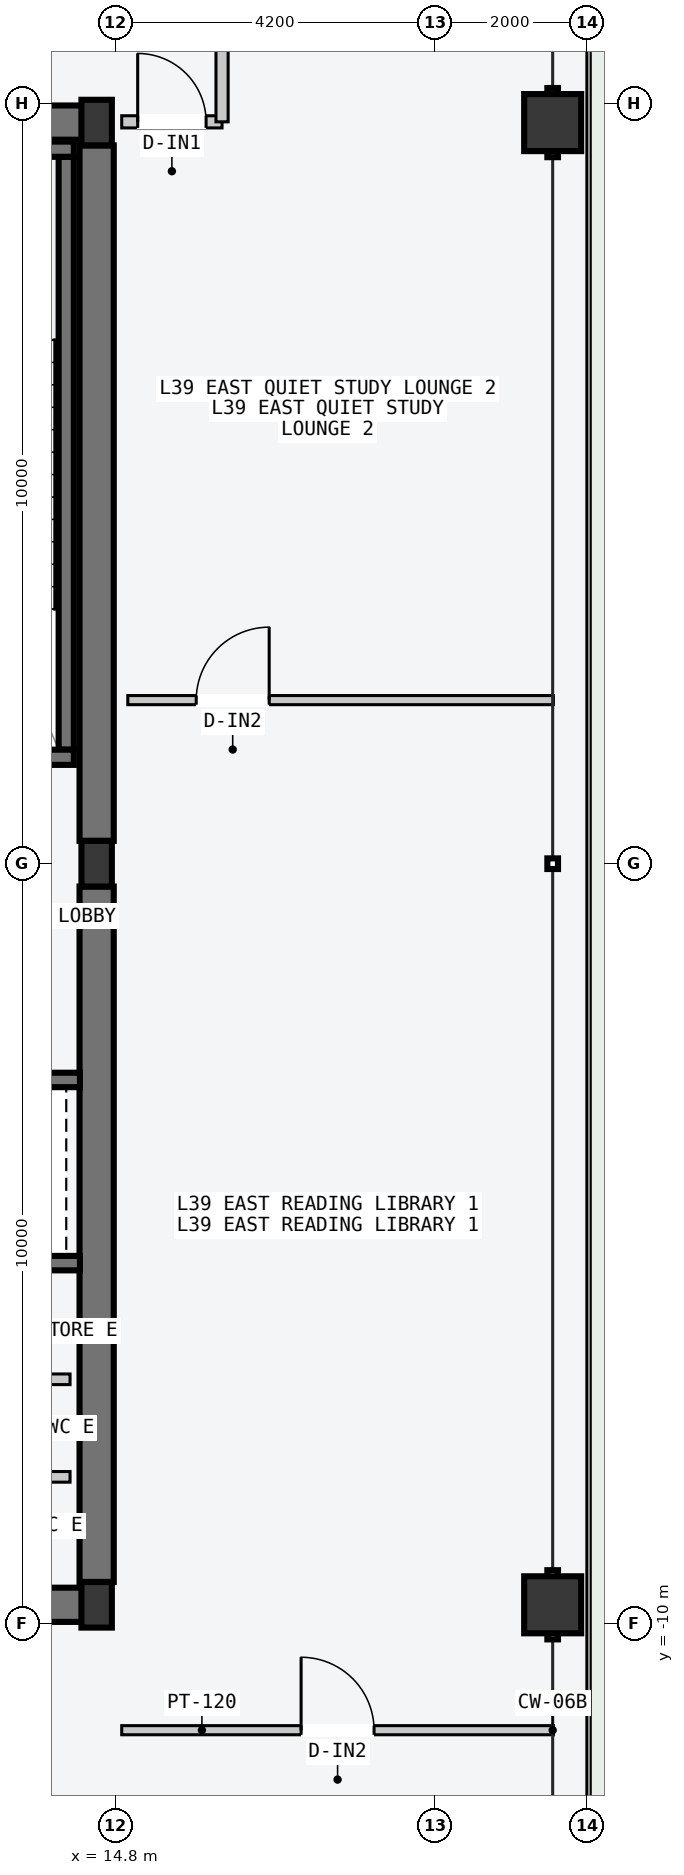
"""IFC4 building model, lengths in metres.
Left out: names, types, materials, properties, quantities, classifications, styles, units other than length and angle.
Written with IfcOpenShell. Run it as: python <this file> out.ifc"""

import sys

from ifc_helpers import new_model, si_unit, direction, frame, frame_2d, origin, origin_2d, place, context, subcontext, project, spatial, rectangle, hollow_rectangle, i_section, extrude, element, fill, save


model = new_model("IFC4")
c1 = context("Model", 3, precision=1e-05, world=origin(), true_north=direction((0.0, 1.0)))
c2 = subcontext(c1, "Body", "Model", "MODEL_VIEW")
j1 = project(units=[si_unit("LENGTHUNIT", "METRE"), si_unit("PLANEANGLEUNIT", "RADIAN")], contexts=[c1])
p1 = place(None, origin())
s1 = spatial("IfcSite", under=j1, at=p1, CompositionType="ELEMENT")
p2 = place(p1, origin())
s2 = spatial("IfcBuilding", under=s1, at=p2, CompositionType="ELEMENT")
p3 = place(p2, frame((0.0, 0.0, 150.6)))
s3 = spatial("IfcBuildingStorey", under=s2, at=p3, CompositionType="ELEMENT", Elevation=150.6)
for number, where, z_axis, x_axis in (
    (1, (8.07, -9.75, -0.2), (0.0, 0.0, 1.0), (1.0, 0.0, 0.0)),
    (2, (8.07, 9.75, -0.2), (0.0, 0.0, 1.0), (1.0, 0.0, 0.0)),
):
    element("IfcWall", number, at=place(p3, frame(where, z_axis=z_axis, x_axis=x_axis)), inside=s3, PredefinedType="SHEAR", context=c2, shape_type="SweptSolid", body=[
        extrude(rectangle(XDim=6.46, YDim=0.45, at=frame_2d((3.23, 0.0))), origin(), (0.0, 0.0, 1.0), 4.5),
    ])
for number, where, z_axis, x_axis in (
    (3, (14.55, -9.45, -0.2), (0.0, 0.0, 1.0), (0.0, 1.0, 0.0)),
    (4, (14.55, 0.3, -0.2), (0.0, 0.0, 1.0), (0.0, 1.0, 0.0)),
):
    element("IfcWall", number, at=place(p3, frame(where, z_axis=z_axis, x_axis=x_axis)), inside=s3, PredefinedType="SHEAR", context=c2, shape_type="SweptSolid", body=[
        extrude(rectangle(XDim=9.15, YDim=0.45, at=frame_2d((4.575, 0.0))), origin(), (0.0, 0.0, 1.0), 4.5),
    ])
p4 = place(p3, frame((14.15, 1.5, -0.2), z_axis=(0.0, 0.0, 1.0), x_axis=(0.0, 1.0, 0.0)))
e5 = element("IfcWall", 5, at=p4, inside=s3, PredefinedType="SOLIDWALL", context=c2, shape_type="SweptSolid", body=[
    extrude(rectangle(XDim=7.8, YDim=0.2, at=frame_2d((3.9, 0.0))), origin(), (0.0, 0.0, 1.0), 4.5),
])
p5 = place(p3, frame((10.15, 1.4, -0.2), z_axis=(0.0, 0.0, 1.0), x_axis=(1.0, 0.0, 0.0)))
e6 = element("IfcWall", 6, at=p5, inside=s3, PredefinedType="SOLIDWALL", context=c2, shape_type="SweptSolid", body=[
    extrude(rectangle(XDim=4.1, YDim=0.2, at=frame_2d((2.05, 0.0))), origin(), (0.0, 0.0, 1.0), 4.5),
])
p6 = place(p5, frame((1.5, 0.0, 0.2)))
e7 = element("IfcOpeningElement", 7, at=p6, cuts=e6, PredefinedType="OPENING", context=c2, shape_type="SweptSolid", body=[
    extrude(rectangle(XDim=1.12, YDim=2.18, at=frame_2d((0.56, 1.09))), frame((0.0, 0.11, 0.0), z_axis=(0.0, -1.0, 0.0), x_axis=(1.0, 0.0, 0.0)), (0.0, 0.0, 1.0), 0.22),
])
p7 = place(p3, frame((10.15, 9.4, -0.2), z_axis=(0.0, 0.0, 1.0), x_axis=(1.0, 0.0, 0.0)))
e8 = element("IfcWall", 8, at=p7, inside=s3, PredefinedType="SOLIDWALL", context=c2, shape_type="SweptSolid", body=[
    extrude(rectangle(XDim=4.1, YDim=0.2, at=frame_2d((2.05, 0.0))), origin(), (0.0, 0.0, 1.0), 4.5),
])
for number, where, z_axis, x_axis in (
    (9, (14.55, -9.75, 0.0), (0.0, 0.0, 1.0), (1.0, 0.0, 0.0)),
    (10, (14.55, 0.0, 0.0), (0.0, 0.0, 1.0), (1.0, 0.0, 0.0)),
    (11, (14.55, 9.75, 0.0), (0.0, 0.0, 1.0), (1.0, 0.0, 0.0)),
):
    element("IfcColumn", number, at=place(p3, frame(where, z_axis=z_axis, x_axis=x_axis)), inside=s3, PredefinedType="COLUMN", context=c2, shape_type="SweptSolid", body=[
        extrude(i_section(OverallWidth=0.4, OverallDepth=0.6, WebThickness=0.022, FlangeThickness=0.036, at=origin_2d()), origin(), (0.0, 0.0, 1.0), 4.5),
    ])
for number, where, z_axis, x_axis in (
    (12, (20.55, -9.75, -0.2), (0.0, 0.0, 1.0), (0.0, 1.0, 0.0)),
    (13, (20.55, 9.75, -0.2), (0.0, 0.0, 1.0), (0.0, 1.0, 0.0)),
):
    element("IfcColumn", number, at=place(p3, frame(where, z_axis=z_axis, x_axis=x_axis)), inside=s3, PredefinedType="COLUMN", context=c2, shape_type="SweptSolid", body=[
        extrude(hollow_rectangle(XDim=0.75, YDim=0.75, WallThickness=0.032, at=origin_2d()), origin(), (0.0, 0.0, 1.0), 4.7),
    ])
p8 = place(p3, frame((11.65, -2.845, -0.2), z_axis=(0.0, 0.0, 1.0), x_axis=(1.0, 0.0, 0.0)))
e14 = element("IfcWall", 14, at=p8, inside=s3, PredefinedType="SOLIDWALL", context=c2, shape_type="SweptSolid", body=[
    extrude(rectangle(XDim=2.68, YDim=0.19, at=frame_2d((1.34, 0.0))), origin(), (0.0, 0.0, 1.0), 4.5),
])
p9 = place(p8, frame((0.65, 0.0, 0.2)))
e15 = element("IfcOpeningElement", 15, at=p9, cuts=e14, PredefinedType="OPENING", context=c2, shape_type="SweptSolid", body=[
    extrude(rectangle(XDim=1.2, YDim=2.2, at=frame_2d((0.6, 1.1))), frame((0.0, 0.105, 0.0), z_axis=(0.0, -1.0, 0.0), x_axis=(1.0, 0.0, 0.0)), (0.0, 0.0, 1.0), 0.21),
])
p10 = place(p3, frame((11.65, -5.255, -0.2), z_axis=(0.0, 0.0, 1.0), x_axis=(1.0, 0.0, 0.0)))
e16 = element("IfcWall", 16, at=p10, inside=s3, PredefinedType="SOLIDWALL", context=c2, shape_type="SweptSolid", body=[
    extrude(rectangle(XDim=2.68, YDim=0.19, at=frame_2d((1.34, 0.0))), origin(), (0.0, 0.0, 1.0), 4.5),
])
for number, where, z_axis, x_axis in (
    (17, (11.7, -8.067, 0.0), (0.0, 0.0, 1.0), (1.0, 0.0, 0.0)),
    (18, (11.7, -6.783, 0.0), (0.0, 0.0, 1.0), (1.0, 0.0, 0.0)),
):
    element("IfcWall", number, at=place(p3, frame(where, z_axis=z_axis, x_axis=x_axis)), inside=s3, PredefinedType="PARTITIONING", context=c2, shape_type="SweptSolid", body=[
        extrude(rectangle(XDim=2.5, YDim=0.14, at=frame_2d((1.25, 0.0))), origin(), (0.0, 0.0, 1.0), 4.3),
    ])
p11 = place(p3, frame((14.88, -11.4, 0.0), z_axis=(0.0, 0.0, 1.0), x_axis=(1.0, 0.0, 0.0)))
e19 = element("IfcWall", 19, at=p11, inside=s3, PredefinedType="PARTITIONING", context=c2, shape_type="SweptSolid", body=[
    extrude(rectangle(XDim=5.68, YDim=0.12, at=frame_2d((2.84, 0.0))), origin(), (0.0, 0.0, 1.0), 4.3),
])
p12 = place(p11, frame((2.36, 0.0, 0.0)))
e20 = element("IfcOpeningElement", 20, at=p12, cuts=e19, PredefinedType="OPENING", context=c2, shape_type="SweptSolid", body=[
    extrude(rectangle(XDim=0.96, YDim=2.18, at=frame_2d((0.48, 1.09))), frame((0.0, 0.07, 0.0), z_axis=(0.0, -1.0, 0.0), x_axis=(1.0, 0.0, 0.0)), (0.0, 0.0, 1.0), 0.14),
])
p13 = place(p3, frame((14.88, 9.76, 0.0), z_axis=(0.0, 0.0, 1.0), x_axis=(1.0, 0.0, 0.0)))
e21 = element("IfcWall", 21, at=p13, inside=s3, PredefinedType="PARTITIONING", context=c2, shape_type="SweptSolid", body=[
    extrude(rectangle(XDim=1.32, YDim=0.16, at=frame_2d((0.66, 0.0))), origin(), (0.0, 0.0, 1.0), 3.6),
])
p14 = place(p13, frame((0.21, 0.0, 0.0)))
e22 = element("IfcOpeningElement", 22, at=p14, cuts=e21, PredefinedType="OPENING", context=c2, shape_type="SweptSolid", body=[
    extrude(rectangle(XDim=0.9, YDim=2.15, at=frame_2d((0.45, 1.075))), frame((0.0, 0.09, 0.0), z_axis=(0.0, -1.0, 0.0), x_axis=(1.0, 0.0, 0.0)), (0.0, 0.0, 1.0), 0.18),
])
p15 = place(p3, frame((16.2, 9.76, 0.0), z_axis=(0.0, 0.0, 1.0), x_axis=(0.0, 1.0, 0.0)))
e23 = element("IfcWall", 23, at=p15, inside=s3, PredefinedType="PARTITIONING", context=c2, shape_type="SweptSolid", body=[
    extrude(rectangle(XDim=1.95, YDim=0.16, at=frame_2d((0.975, 0.0))), origin(), (0.0, 0.0, 1.0), 4.3),
])
p16 = place(p3, frame((14.96, 2.152, 0.0), z_axis=(0.0, 0.0, 1.0), x_axis=(1.0, 0.0, 0.0)))
e24 = element("IfcWall", 24, at=p16, inside=s3, PredefinedType="PARTITIONING", context=c2, shape_type="SweptSolid", body=[
    extrude(rectangle(XDim=5.6, YDim=0.12, at=frame_2d((2.8, 0.0))), origin(), (0.0, 0.0, 1.0), 4.3),
])
p17 = place(p16, frame((0.9, 0.0, 0.0)))
e25 = element("IfcOpeningElement", 25, at=p17, cuts=e24, PredefinedType="OPENING", context=c2, shape_type="SweptSolid", body=[
    extrude(rectangle(XDim=0.96, YDim=2.18, at=frame_2d((0.48, 1.09))), frame((0.0, 0.07, 0.0), z_axis=(0.0, -1.0, 0.0), x_axis=(1.0, 0.0, 0.0)), (0.0, 0.0, 1.0), 0.14),
])
p18 = place(p12, origin())
e26 = element("IfcDoor", 26, at=p18, inside=s3, OperationType="SINGLE_SWING_LEFT", PredefinedType="DOOR", context=c2, shape_type="SweptSolid", body=[
    extrude(rectangle(XDim=0.96, YDim=2.18, at=frame_2d((0.48, 1.09))), frame((0.0, 0.025, 0.0), z_axis=(0.0, -1.0, 0.0), x_axis=(1.0, 0.0, 0.0)), (0.0, 0.0, 1.0), 0.05),
])
fill(e20, e26)
p19 = place(p14, origin())
e27 = element("IfcDoor", 27, at=p19, inside=s3, OperationType="SINGLE_SWING_LEFT", PredefinedType="DOOR", context=c2, shape_type="SweptSolid", body=[
    extrude(rectangle(XDim=0.9, YDim=2.15, at=frame_2d((0.45, 1.075))), frame((0.0, 0.025, 0.0), z_axis=(0.0, -1.0, 0.0), x_axis=(1.0, 0.0, 0.0)), (0.0, 0.0, 1.0), 0.05),
])
fill(e22, e27)
p20 = place(p17, origin())
e28 = element("IfcDoor", 28, at=p20, inside=s3, OperationType="SINGLE_SWING_RIGHT", PredefinedType="DOOR", context=c2, shape_type="SweptSolid", body=[
    extrude(rectangle(XDim=0.96, YDim=2.18, at=frame_2d((0.48, 1.09))), frame((0.0, 0.025, 0.0), z_axis=(0.0, -1.0, 0.0), x_axis=(1.0, 0.0, 0.0)), (0.0, 0.0, 1.0), 0.05),
])
fill(e25, e28)
save(model, sys.argv[1])
